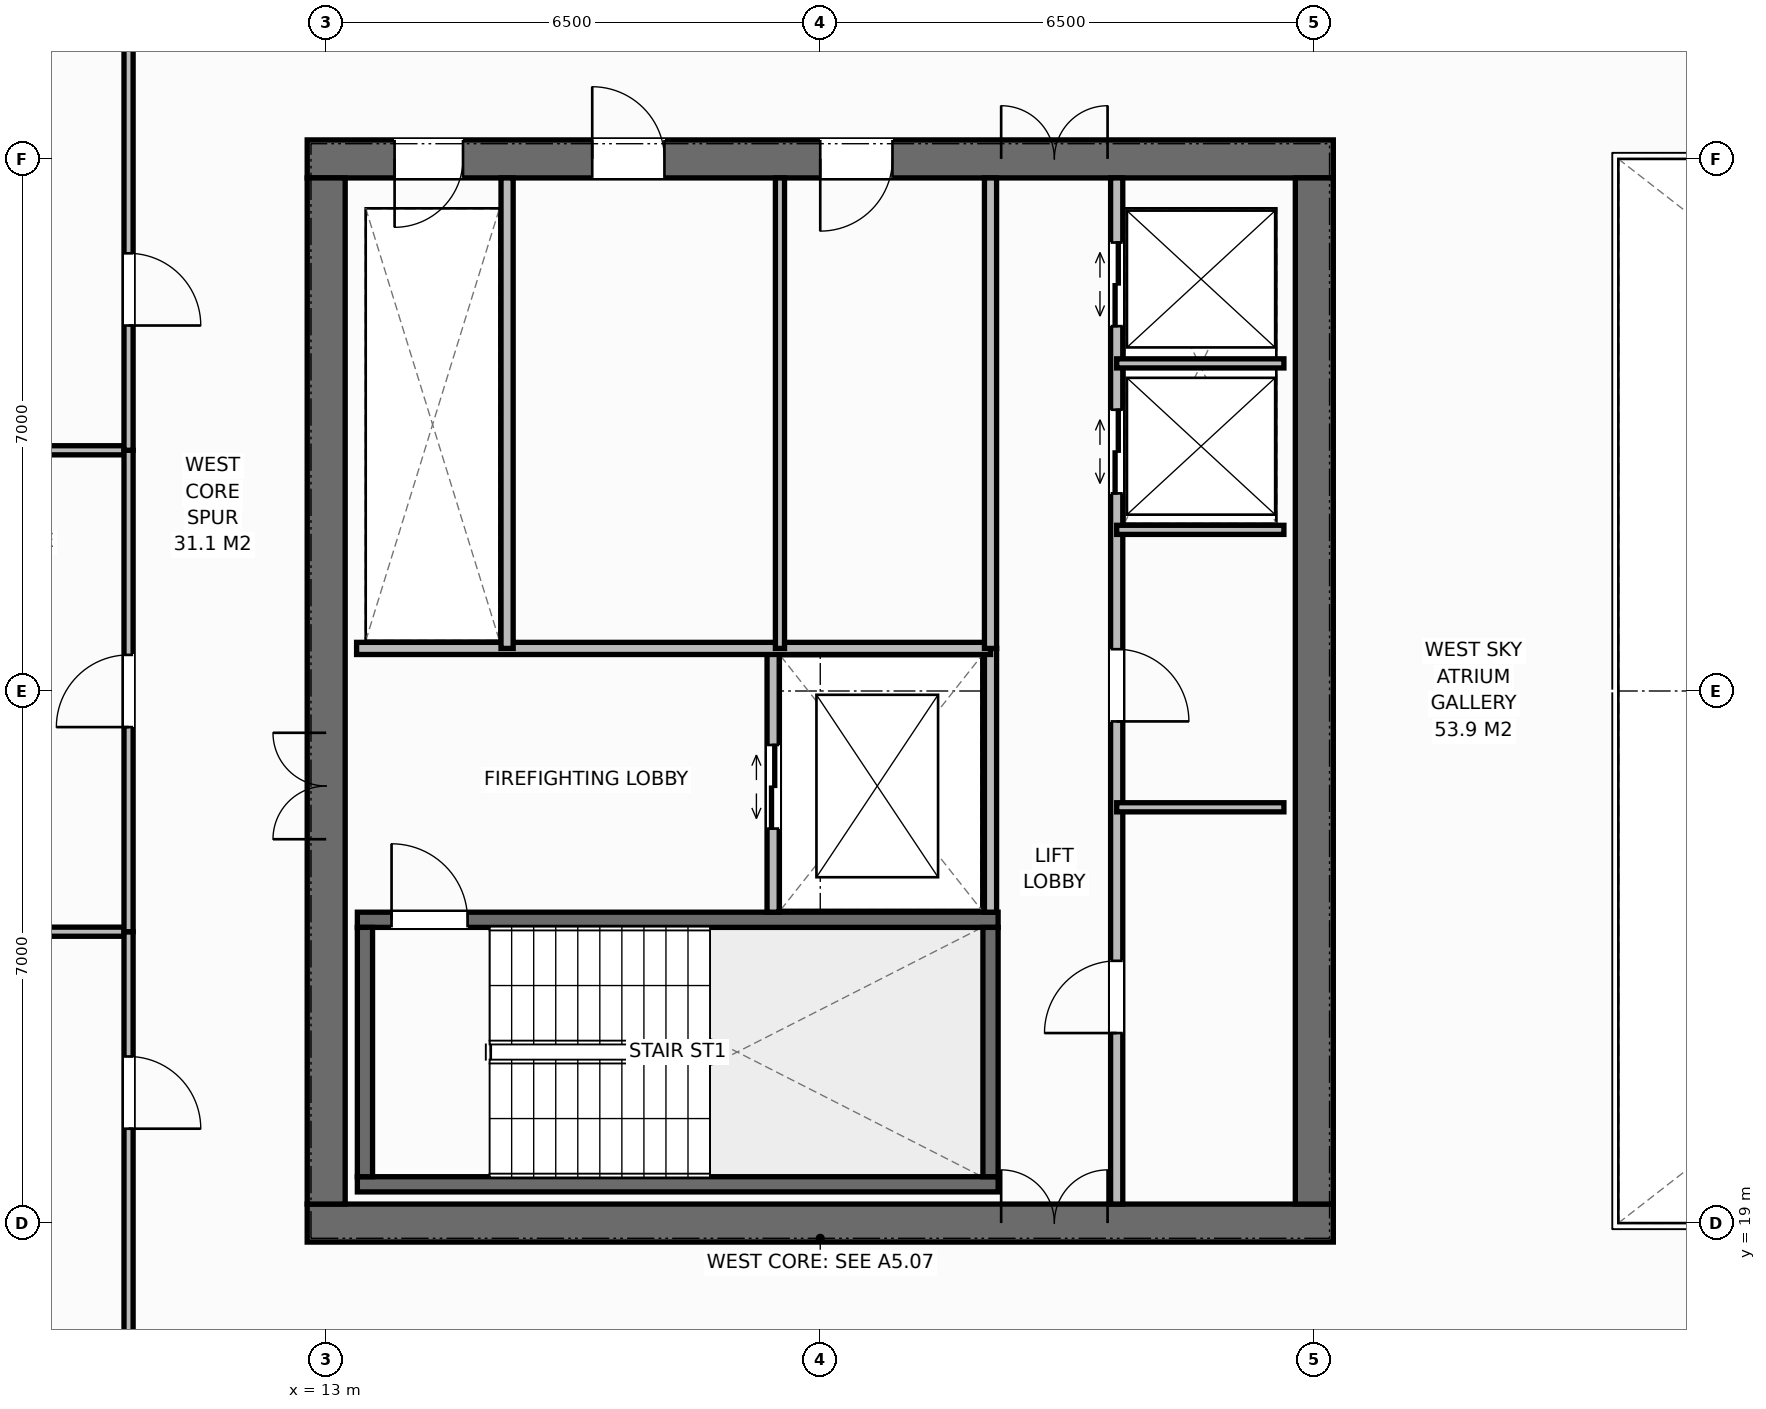
"""IFC4 building model, lengths in metres.
Left out: names, types, materials, properties, quantities, classifications, styles, units other than length and angle.
Written with IfcOpenShell. Run it as: python <this file> out.ifc"""

import sys

from ifc_helpers import new_model, si_unit, direction, frame, frame_2d, origin, place, context, subcontext, project, spatial, rectangle, extrude, element, fill, save


model = new_model("IFC4")
c1 = context("Model", 3, precision=1e-05, world=origin(), true_north=direction((0.0, 1.0)))
c2 = subcontext(c1, "Body", "Model", "MODEL_VIEW")
j1 = project(units=[si_unit("LENGTHUNIT", "METRE"), si_unit("PLANEANGLEUNIT", "RADIAN")], contexts=[c1])
p1 = place(None, origin())
s1 = spatial("IfcSite", under=j1, at=p1, CompositionType="ELEMENT")
p2 = place(p1, origin())
s2 = spatial("IfcBuilding", under=s1, at=p2, CompositionType="ELEMENT")
p3 = place(p2, frame((0.0, 0.0, 263.2)))
s3 = spatial("IfcBuildingStorey", under=s2, at=p3, CompositionType="ELEMENT", Elevation=263.2)
p4 = place(p3, frame((12.75, 19.0, 0.0), z_axis=(0.0, 0.0, 1.0), x_axis=(1.0, 0.0, 0.0)))
e1 = element("IfcWall", 1, at=p4, inside=s3, PredefinedType="SHEAR", context=c2, shape_type="SweptSolid", body=[
    extrude(rectangle(XDim=13.5, YDim=0.5, at=frame_2d((6.75, 0.0))), origin(), (0.0, 0.0, 1.0), 3.8),
])
p5 = place(p4, frame((9.13, 0.0, 0.0)))
e2 = element("IfcOpeningElement", 2, at=p5, cuts=e1, PredefinedType="OPENING", context=c2, shape_type="SweptSolid", body=[
    extrude(rectangle(XDim=1.4, YDim=2.2, at=frame_2d((0.7, 1.1))), frame((0.0, 0.26, 0.0), z_axis=(0.0, -1.0, 0.0), x_axis=(1.0, 0.0, 0.0)), (0.0, 0.0, 1.0), 0.52),
])
p6 = place(p3, frame((12.75, 33.0, 0.0), z_axis=(0.0, 0.0, 1.0), x_axis=(1.0, 0.0, 0.0)))
e3 = element("IfcWall", 3, at=p6, inside=s3, PredefinedType="SHEAR", context=c2, shape_type="SweptSolid", body=[
    extrude(rectangle(XDim=13.5, YDim=0.5, at=frame_2d((6.75, 0.0))), origin(), (0.0, 0.0, 1.0), 3.8),
])
p7 = place(p6, frame((1.15, 0.0, 0.0)))
e4 = element("IfcOpeningElement", 4, at=p7, cuts=e3, PredefinedType="OPENING", context=c2, shape_type="SweptSolid", body=[
    extrude(rectangle(XDim=0.9, YDim=2.15, at=frame_2d((0.45, 1.075))), frame((0.0, 0.26, 0.0), z_axis=(0.0, -1.0, 0.0), x_axis=(1.0, 0.0, 0.0)), (0.0, 0.0, 1.0), 0.52),
])
p8 = place(p6, frame((3.75, 0.0, 0.0)))
e5 = element("IfcOpeningElement", 5, at=p8, cuts=e3, PredefinedType="OPENING", context=c2, shape_type="SweptSolid", body=[
    extrude(rectangle(XDim=0.95, YDim=2.15, at=frame_2d((0.475, 1.075))), frame((0.0, 0.26, 0.0), z_axis=(0.0, -1.0, 0.0), x_axis=(1.0, 0.0, 0.0)), (0.0, 0.0, 1.0), 0.52),
])
p9 = place(p6, frame((6.75, 0.0, 0.0)))
e6 = element("IfcOpeningElement", 6, at=p9, cuts=e3, PredefinedType="OPENING", context=c2, shape_type="SweptSolid", body=[
    extrude(rectangle(XDim=0.95, YDim=2.15, at=frame_2d((0.475, 1.075))), frame((0.0, 0.26, 0.0), z_axis=(0.0, -1.0, 0.0), x_axis=(1.0, 0.0, 0.0)), (0.0, 0.0, 1.0), 0.52),
])
p10 = place(p6, frame((9.13, 0.0, 0.0)))
e7 = element("IfcOpeningElement", 7, at=p10, cuts=e3, PredefinedType="OPENING", context=c2, shape_type="SweptSolid", body=[
    extrude(rectangle(XDim=1.4, YDim=2.2, at=frame_2d((0.7, 1.1))), frame((0.0, 0.26, 0.0), z_axis=(0.0, -1.0, 0.0), x_axis=(1.0, 0.0, 0.0)), (0.0, 0.0, 1.0), 0.52),
])
p11 = place(p3, frame((13.0, 19.25, 0.0), z_axis=(0.0, 0.0, 1.0), x_axis=(0.0, 1.0, 0.0)))
e8 = element("IfcWall", 8, at=p11, inside=s3, PredefinedType="SHEAR", context=c2, shape_type="SweptSolid", body=[
    extrude(rectangle(XDim=13.5, YDim=0.5, at=frame_2d((6.75, 0.0))), origin(), (0.0, 0.0, 1.0), 3.8),
])
p12 = place(p11, frame((4.8, 0.0, 0.0)))
e9 = element("IfcOpeningElement", 9, at=p12, cuts=e8, PredefinedType="OPENING", context=c2, shape_type="SweptSolid", body=[
    extrude(rectangle(XDim=1.4, YDim=2.2, at=frame_2d((0.7, 1.1))), frame((0.0, 0.26, 0.0), z_axis=(0.0, -1.0, 0.0), x_axis=(1.0, 0.0, 0.0)), (0.0, 0.0, 1.0), 0.52),
])
p13 = place(p3, frame((26.0, 19.25, 0.0), z_axis=(0.0, 0.0, 1.0), x_axis=(0.0, 1.0, 0.0)))
e10 = element("IfcWall", 10, at=p13, inside=s3, PredefinedType="SHEAR", context=c2, shape_type="SweptSolid", body=[
    extrude(rectangle(XDim=13.5, YDim=0.5, at=frame_2d((6.75, 0.0))), origin(), (0.0, 0.0, 1.0), 3.8),
])
p14 = place(p3, frame((13.41, 19.51, 0.0), z_axis=(0.0, 0.0, 1.0), x_axis=(1.0, 0.0, 0.0)))
e11 = element("IfcWall", 11, at=p14, inside=s3, PredefinedType="SHEAR", context=c2, shape_type="SweptSolid", body=[
    extrude(rectangle(XDim=8.43, YDim=0.2, at=frame_2d((4.215, 0.0))), origin(), (0.0, 0.0, 1.0), 3.8),
])
p15 = place(p3, frame((13.41, 22.99, 0.0), z_axis=(0.0, 0.0, 1.0), x_axis=(1.0, 0.0, 0.0)))
e12 = element("IfcWall", 12, at=p15, inside=s3, PredefinedType="SHEAR", context=c2, shape_type="SweptSolid", body=[
    extrude(rectangle(XDim=8.43, YDim=0.2, at=frame_2d((4.215, 0.0))), origin(), (0.0, 0.0, 1.0), 3.8),
])
p16 = place(p15, frame((0.45, 0.0, 0.0)))
e13 = element("IfcOpeningElement", 13, at=p16, cuts=e12, PredefinedType="OPENING", context=c2, shape_type="SweptSolid", body=[
    extrude(rectangle(XDim=1.0, YDim=2.15, at=frame_2d((0.5, 1.075))), frame((0.0, 0.11, 0.0), z_axis=(0.0, -1.0, 0.0), x_axis=(1.0, 0.0, 0.0)), (0.0, 0.0, 1.0), 0.22),
])
for number, where, z_axis, x_axis in (
    (14, (13.51, 19.61, 0.0), (0.0, 0.0, 1.0), (0.0, 1.0, 0.0)),
    (15, (21.74, 19.61, 0.0), (0.0, 0.0, 1.0), (0.0, 1.0, 0.0)),
):
    element("IfcWall", number, at=place(p3, frame(where, z_axis=z_axis, x_axis=x_axis)), inside=s3, PredefinedType="SHEAR", context=c2, shape_type="SweptSolid", body=[
        extrude(rectangle(XDim=3.28, YDim=0.2, at=frame_2d((1.64, 0.0))), origin(), (0.0, 0.0, 1.0), 3.8),
    ])
p17 = place(p3, frame((21.74, 23.09, 0.0), z_axis=(0.0, 0.0, 1.0), x_axis=(0.0, 1.0, 0.0)))
e16 = element("IfcWall", 16, at=p17, inside=s3, PredefinedType="STANDARD", context=c2, shape_type="SweptSolid", body=[
    extrude(rectangle(XDim=3.47, YDim=0.16, at=frame_2d((1.735, 0.0))), origin(), (0.0, 0.0, 1.0), 3.588),
])
p18 = place(p3, frame((18.88, 23.09, 0.0), z_axis=(0.0, 0.0, 1.0), x_axis=(0.0, 1.0, 0.0)))
e17 = element("IfcWall", 17, at=p18, inside=s3, PredefinedType="STANDARD", context=c2, shape_type="SweptSolid", body=[
    extrude(rectangle(XDim=3.47, YDim=0.16, at=frame_2d((1.735, 0.0))), origin(), (0.0, 0.0, 1.0), 3.588),
])
p19 = place(p18, frame((1.1, 0.0, 0.0)))
e18 = element("IfcOpeningElement", 18, at=p19, cuts=e17, PredefinedType="OPENING", context=c2, shape_type="SweptSolid", body=[
    extrude(rectangle(XDim=1.1, YDim=2.2, at=frame_2d((0.55, 1.1))), frame((0.0, 0.09, 0.0), z_axis=(0.0, -1.0, 0.0), x_axis=(1.0, 0.0, 0.0)), (0.0, 0.0, 1.0), 0.18),
])
p20 = place(p3, frame((13.4, 26.56, 0.0), z_axis=(0.0, 0.0, 1.0), x_axis=(1.0, 0.0, 0.0)))
e19 = element("IfcWall", 19, at=p20, inside=s3, PredefinedType="STANDARD", context=c2, shape_type="SweptSolid", body=[
    extrude(rectangle(XDim=8.34, YDim=0.16, at=frame_2d((4.17, 0.0))), origin(), (0.0, 0.0, 1.0), 3.588),
])
p21 = place(p3, frame((15.38, 26.56, 0.0), z_axis=(0.0, 0.0, 1.0), x_axis=(0.0, 1.0, 0.0)))
e20 = element("IfcWall", 20, at=p21, inside=s3, PredefinedType="STANDARD", context=c2, shape_type="SweptSolid", body=[
    extrude(rectangle(XDim=6.19, YDim=0.16, at=frame_2d((3.095, 0.0))), origin(), (0.0, 0.0, 1.0), 3.588),
])
p22 = place(p3, frame((18.97, 26.56, 0.0), z_axis=(0.0, 0.0, 1.0), x_axis=(0.0, 1.0, 0.0)))
e21 = element("IfcWall", 21, at=p22, inside=s3, PredefinedType="PARTITIONING", context=c2, shape_type="SweptSolid", body=[
    extrude(rectangle(XDim=6.19, YDim=0.12, at=frame_2d((3.095, 0.0))), origin(), (0.0, 0.0, 1.0), 3.588),
])
p23 = place(p3, frame((21.74, 26.56, 0.0), z_axis=(0.0, 0.0, 1.0), x_axis=(0.0, 1.0, 0.0)))
e22 = element("IfcWall", 22, at=p23, inside=s3, PredefinedType="STANDARD", context=c2, shape_type="SweptSolid", body=[
    extrude(rectangle(XDim=6.19, YDim=0.16, at=frame_2d((3.095, 0.0))), origin(), (0.0, 0.0, 1.0), 3.588),
])
p24 = place(p3, frame((23.4, 19.25, 0.0), z_axis=(0.0, 0.0, 1.0), x_axis=(0.0, 1.0, 0.0)))
e23 = element("IfcWall", 23, at=p24, inside=s3, PredefinedType="STANDARD", context=c2, shape_type="SweptSolid", body=[
    extrude(rectangle(XDim=13.5, YDim=0.16, at=frame_2d((6.75, 0.0))), origin(), (0.0, 0.0, 1.0), 3.588),
])
p25 = place(p24, frame((2.25, 0.0, 0.0)))
e24 = element("IfcOpeningElement", 24, at=p25, cuts=e23, PredefinedType="OPENING", context=c2, shape_type="SweptSolid", body=[
    extrude(rectangle(XDim=0.95, YDim=2.15, at=frame_2d((0.475, 1.075))), frame((0.0, 0.09, 0.0), z_axis=(0.0, -1.0, 0.0), x_axis=(1.0, 0.0, 0.0)), (0.0, 0.0, 1.0), 0.18),
])
p26 = place(p24, frame((6.35, 0.0, 0.0)))
e25 = element("IfcOpeningElement", 25, at=p26, cuts=e23, PredefinedType="OPENING", context=c2, shape_type="SweptSolid", body=[
    extrude(rectangle(XDim=0.95, YDim=2.15, at=frame_2d((0.475, 1.075))), frame((0.0, 0.09, 0.0), z_axis=(0.0, -1.0, 0.0), x_axis=(1.0, 0.0, 0.0)), (0.0, 0.0, 1.0), 0.18),
])
p27 = place(p24, frame((9.35, 0.0, 0.0)))
e26 = element("IfcOpeningElement", 26, at=p27, cuts=e23, PredefinedType="OPENING", context=c2, shape_type="SweptSolid", body=[
    extrude(rectangle(XDim=1.1, YDim=2.2, at=frame_2d((0.55, 1.1))), frame((0.0, 0.09, 0.0), z_axis=(0.0, -1.0, 0.0), x_axis=(1.0, 0.0, 0.0)), (0.0, 0.0, 1.0), 0.18),
])
p28 = place(p24, frame((11.55, 0.0, 0.0)))
e27 = element("IfcOpeningElement", 27, at=p28, cuts=e23, PredefinedType="OPENING", context=c2, shape_type="SweptSolid", body=[
    extrude(rectangle(XDim=1.1, YDim=2.2, at=frame_2d((0.55, 1.1))), frame((0.0, 0.09, 0.0), z_axis=(0.0, -1.0, 0.0), x_axis=(1.0, 0.0, 0.0)), (0.0, 0.0, 1.0), 0.18),
])
for number, where, z_axis, x_axis in (
    (28, (23.4, 24.47, 0.0), (0.0, 0.0, 1.0), (1.0, 0.0, 0.0)),
    (29, (23.4, 28.12, 0.0), (0.0, 0.0, 1.0), (1.0, 0.0, 0.0)),
    (30, (23.4, 30.31, 0.0), (0.0, 0.0, 1.0), (1.0, 0.0, 0.0)),
):
    element("IfcWall", number, at=place(p3, frame(where, z_axis=z_axis, x_axis=x_axis)), inside=s3, PredefinedType="PARTITIONING", context=c2, shape_type="SweptSolid", body=[
        extrude(rectangle(XDim=2.2, YDim=0.12, at=frame_2d((1.1, 0.0))), origin(), (0.0, 0.0, 1.0), 3.588),
    ])
p29 = place(p3, frame((7.22, 22.833, 0.0), z_axis=(0.0, 0.0, 1.0), x_axis=(1.0, 0.0, 0.0)))
e31 = element("IfcWall", 31, at=p29, inside=s3, PredefinedType="PARTITIONING", context=c2, shape_type="SweptSolid", body=[
    extrude(rectangle(XDim=3.18, YDim=0.12, at=frame_2d((1.59, 0.0))), origin(), (0.0, 0.0, 1.0), 3.588),
])
p30 = place(p3, frame((10.4, 16.5, 0.0), z_axis=(0.0, 0.0, 1.0), x_axis=(0.0, 1.0, 0.0)))
e32 = element("IfcWall", 32, at=p30, inside=s3, PredefinedType="PARTITIONING", context=c2, shape_type="SweptSolid", body=[
    extrude(rectangle(XDim=6.333, YDim=0.12, at=frame_2d((3.167, 0.0))), origin(), (0.0, 0.0, 1.0), 3.588),
])
p31 = place(p30, frame((3.742, 0.0, 0.0)))
e33 = element("IfcOpeningElement", 33, at=p31, cuts=e32, PredefinedType="OPENING", context=c2, shape_type="SweptSolid", body=[
    extrude(rectangle(XDim=0.95, YDim=2.15, at=frame_2d((0.475, 1.075))), frame((0.0, 0.07, 0.0), z_axis=(0.0, -1.0, 0.0), x_axis=(1.0, 0.0, 0.0)), (0.0, 0.0, 1.0), 0.14),
])
p32 = place(p3, frame((7.22, 29.167, 0.0), z_axis=(0.0, 0.0, 1.0), x_axis=(1.0, 0.0, 0.0)))
e34 = element("IfcWall", 34, at=p32, inside=s3, PredefinedType="PARTITIONING", context=c2, shape_type="SweptSolid", body=[
    extrude(rectangle(XDim=3.18, YDim=0.12, at=frame_2d((1.59, 0.0))), origin(), (0.0, 0.0, 1.0), 3.588),
])
p33 = place(p3, frame((10.4, 22.833, 0.0), z_axis=(0.0, 0.0, 1.0), x_axis=(0.0, 1.0, 0.0)))
e35 = element("IfcWall", 35, at=p33, inside=s3, PredefinedType="PARTITIONING", context=c2, shape_type="SweptSolid", body=[
    extrude(rectangle(XDim=6.333, YDim=0.12, at=frame_2d((3.167, 0.0))), origin(), (0.0, 0.0, 1.0), 3.588),
])
p34 = place(p33, frame((2.692, 0.0, 0.0)))
e36 = element("IfcOpeningElement", 36, at=p34, cuts=e35, PredefinedType="OPENING", context=c2, shape_type="SweptSolid", body=[
    extrude(rectangle(XDim=0.95, YDim=2.15, at=frame_2d((0.475, 1.075))), frame((0.0, 0.07, 0.0), z_axis=(0.0, -1.0, 0.0), x_axis=(1.0, 0.0, 0.0)), (0.0, 0.0, 1.0), 0.14),
])
p35 = place(p3, frame((10.4, 29.167, 0.0), z_axis=(0.0, 0.0, 1.0), x_axis=(0.0, 1.0, 0.0)))
e37 = element("IfcWall", 37, at=p35, inside=s3, PredefinedType="PARTITIONING", context=c2, shape_type="SweptSolid", body=[
    extrude(rectangle(XDim=6.333, YDim=0.12, at=frame_2d((3.167, 0.0))), origin(), (0.0, 0.0, 1.0), 3.588),
])
p36 = place(p35, frame((1.642, 0.0, 0.0)))
e38 = element("IfcOpeningElement", 38, at=p36, cuts=e37, PredefinedType="OPENING", context=c2, shape_type="SweptSolid", body=[
    extrude(rectangle(XDim=0.95, YDim=2.15, at=frame_2d((0.475, 1.075))), frame((0.0, 0.07, 0.0), z_axis=(0.0, -1.0, 0.0), x_axis=(1.0, 0.0, 0.0)), (0.0, 0.0, 1.0), 0.14),
])
p37 = place(p16, origin())
e39 = element("IfcDoor", 39, at=p37, inside=s3, OperationType="SINGLE_SWING_LEFT", PredefinedType="DOOR", context=c2, shape_type="SweptSolid", body=[
    extrude(rectangle(XDim=1.0, YDim=2.15, at=frame_2d((0.5, 1.075))), frame((0.0, 0.025, 0.0), z_axis=(0.0, -1.0, 0.0), x_axis=(1.0, 0.0, 0.0)), (0.0, 0.0, 1.0), 0.05),
])
fill(e13, e39)
p38 = place(p12, origin())
e40 = element("IfcDoor", 40, at=p38, inside=s3, OperationType="DOUBLE_DOOR_SINGLE_SWING", PredefinedType="DOOR", context=c2, shape_type="SweptSolid", body=[
    extrude(rectangle(XDim=1.4, YDim=2.2, at=frame_2d((0.7, 1.1))), frame((0.0, 0.025, 0.0), z_axis=(0.0, -1.0, 0.0), x_axis=(1.0, 0.0, 0.0)), (0.0, 0.0, 1.0), 0.05),
])
fill(e9, e40)
p39 = place(p19, origin())
e41 = element("IfcDoor", 41, at=p39, inside=s3, OperationType="DOUBLE_DOOR_SLIDING", PredefinedType="DOOR", context=c2, shape_type="SweptSolid", body=[
    extrude(rectangle(XDim=1.1, YDim=2.2, at=frame_2d((0.55, 1.1))), frame((0.0, 0.025, 0.0), z_axis=(0.0, -1.0, 0.0), x_axis=(1.0, 0.0, 0.0)), (0.0, 0.0, 1.0), 0.05),
])
fill(e18, e41)
p40 = place(p7, origin())
e42 = element("IfcDoor", 42, at=p40, inside=s3, OperationType="SINGLE_SWING_RIGHT", PredefinedType="DOOR", context=c2, shape_type="SweptSolid", body=[
    extrude(rectangle(XDim=0.9, YDim=2.15, at=frame_2d((0.45, 1.075))), frame((0.0, -0.025, 0.0), z_axis=(0.0, -1.0, 0.0), x_axis=(1.0, 0.0, 0.0)), (0.0, 0.0, 1.0), 0.05),
])
fill(e4, e42)
p41 = place(p8, origin())
e43 = element("IfcDoor", 43, at=p41, inside=s3, OperationType="SINGLE_SWING_LEFT", PredefinedType="DOOR", context=c2, shape_type="SweptSolid", body=[
    extrude(rectangle(XDim=0.95, YDim=2.15, at=frame_2d((0.475, 1.075))), frame((0.0, -0.025, 0.0), z_axis=(0.0, -1.0, 0.0), x_axis=(1.0, 0.0, 0.0)), (0.0, 0.0, 1.0), 0.05),
])
fill(e5, e43)
p42 = place(p9, origin())
e44 = element("IfcDoor", 44, at=p42, inside=s3, OperationType="SINGLE_SWING_RIGHT", PredefinedType="DOOR", context=c2, shape_type="SweptSolid", body=[
    extrude(rectangle(XDim=0.95, YDim=2.15, at=frame_2d((0.475, 1.075))), frame((0.0, -0.025, 0.0), z_axis=(0.0, -1.0, 0.0), x_axis=(1.0, 0.0, 0.0)), (0.0, 0.0, 1.0), 0.05),
])
fill(e6, e44)
p43 = place(p5, origin())
e45 = element("IfcDoor", 45, at=p43, inside=s3, OperationType="DOUBLE_DOOR_SINGLE_SWING", PredefinedType="DOOR", context=c2, shape_type="SweptSolid", body=[
    extrude(rectangle(XDim=1.4, YDim=2.2, at=frame_2d((0.7, 1.1))), frame((0.0, 0.075, 0.0), z_axis=(0.0, -1.0, 0.0), x_axis=(1.0, 0.0, 0.0)), (0.0, 0.0, 1.0), 0.05),
])
fill(e2, e45)
p44 = place(p10, origin())
e46 = element("IfcDoor", 46, at=p44, inside=s3, OperationType="DOUBLE_DOOR_SINGLE_SWING", PredefinedType="DOOR", context=c2, shape_type="SweptSolid", body=[
    extrude(rectangle(XDim=1.4, YDim=2.2, at=frame_2d((0.7, 1.1))), frame((0.0, -0.025, 0.0), z_axis=(0.0, -1.0, 0.0), x_axis=(1.0, 0.0, 0.0)), (0.0, 0.0, 1.0), 0.05),
])
fill(e7, e46)
p45 = place(p25, origin())
e47 = element("IfcDoor", 47, at=p45, inside=s3, OperationType="SINGLE_SWING_LEFT", PredefinedType="DOOR", context=c2, shape_type="SweptSolid", body=[
    extrude(rectangle(XDim=0.95, YDim=2.15, at=frame_2d((0.475, 1.075))), frame((0.0, 0.025, 0.0), z_axis=(0.0, -1.0, 0.0), x_axis=(1.0, 0.0, 0.0)), (0.0, 0.0, 1.0), 0.05),
])
fill(e24, e47)
p46 = place(p26, origin())
e48 = element("IfcDoor", 48, at=p46, inside=s3, OperationType="SINGLE_SWING_RIGHT", PredefinedType="DOOR", context=c2, shape_type="SweptSolid", body=[
    extrude(rectangle(XDim=0.95, YDim=2.15, at=frame_2d((0.475, 1.075))), frame((0.0, 0.025, 0.0), z_axis=(0.0, -1.0, 0.0), x_axis=(1.0, 0.0, 0.0)), (0.0, 0.0, 1.0), 0.05),
])
fill(e25, e48)
p47 = place(p27, origin())
e49 = element("IfcDoor", 49, at=p47, inside=s3, OperationType="DOUBLE_DOOR_SLIDING", PredefinedType="DOOR", context=c2, shape_type="SweptSolid", body=[
    extrude(rectangle(XDim=1.1, YDim=2.2, at=frame_2d((0.55, 1.1))), frame((0.0, 0.025, 0.0), z_axis=(0.0, -1.0, 0.0), x_axis=(1.0, 0.0, 0.0)), (0.0, 0.0, 1.0), 0.05),
])
fill(e26, e49)
p48 = place(p28, origin())
e50 = element("IfcDoor", 50, at=p48, inside=s3, OperationType="DOUBLE_DOOR_SLIDING", PredefinedType="DOOR", context=c2, shape_type="SweptSolid", body=[
    extrude(rectangle(XDim=1.1, YDim=2.2, at=frame_2d((0.55, 1.1))), frame((0.0, 0.025, 0.0), z_axis=(0.0, -1.0, 0.0), x_axis=(1.0, 0.0, 0.0)), (0.0, 0.0, 1.0), 0.05),
])
fill(e27, e50)
p49 = place(p31, origin())
e51 = element("IfcDoor", 51, at=p49, inside=s3, OperationType="SINGLE_SWING_RIGHT", PredefinedType="DOOR", context=c2, shape_type="SweptSolid", body=[
    extrude(rectangle(XDim=0.95, YDim=2.15, at=frame_2d((0.475, 1.075))), frame((0.0, 0.025, 0.0), z_axis=(0.0, -1.0, 0.0), x_axis=(1.0, 0.0, 0.0)), (0.0, 0.0, 1.0), 0.05),
])
fill(e33, e51)
p50 = place(p34, origin())
e52 = element("IfcDoor", 52, at=p50, inside=s3, OperationType="SINGLE_SWING_LEFT", PredefinedType="DOOR", context=c2, shape_type="SweptSolid", body=[
    extrude(rectangle(XDim=0.95, YDim=2.15, at=frame_2d((0.475, 1.075))), frame((0.0, 0.025, 0.0), z_axis=(0.0, -1.0, 0.0), x_axis=(1.0, 0.0, 0.0)), (0.0, 0.0, 1.0), 0.05),
])
fill(e36, e52)
p51 = place(p36, origin())
e53 = element("IfcDoor", 53, at=p51, inside=s3, OperationType="SINGLE_SWING_RIGHT", PredefinedType="DOOR", context=c2, shape_type="SweptSolid", body=[
    extrude(rectangle(XDim=0.95, YDim=2.15, at=frame_2d((0.475, 1.075))), frame((0.0, 0.025, 0.0), z_axis=(0.0, -1.0, 0.0), x_axis=(1.0, 0.0, 0.0)), (0.0, 0.0, 1.0), 0.05),
])
fill(e38, e53)
save(model, sys.argv[1])
